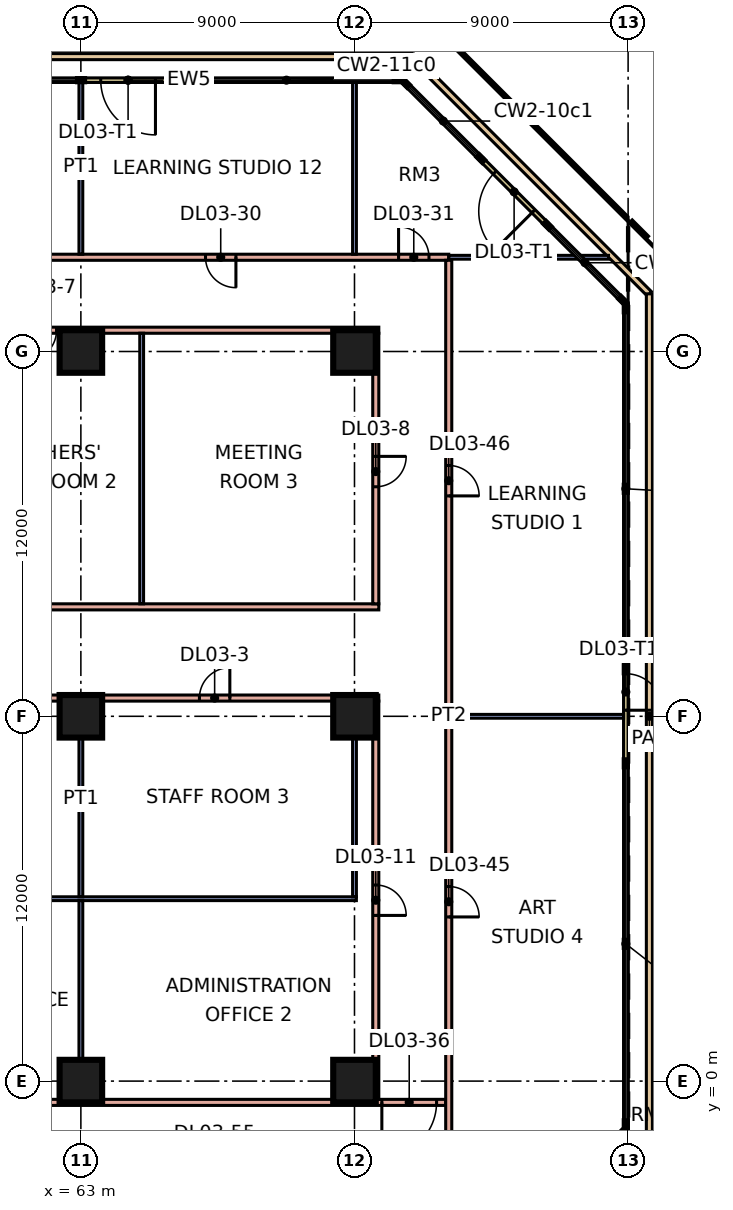
"""IFC4 building model, lengths in metres.
Left out: names, types, materials, properties, quantities, classifications, styles, units other than length and angle.
Written with IfcOpenShell. Run it as: python <this file> out.ifc"""

import sys

from ifc_helpers import new_model, si_unit, direction, frame, frame_2d, origin, origin_2d, place, context, subcontext, project, spatial, rectangle, extrude, element, fill, save


model = new_model("IFC4")
c1 = context("Model", 3, precision=1e-05, world=origin(), true_north=direction((0.0, 1.0)))
c2 = subcontext(c1, "Body", "Model", "MODEL_VIEW")
j1 = project(units=[si_unit("LENGTHUNIT", "METRE"), si_unit("PLANEANGLEUNIT", "RADIAN")], contexts=[c1])
p1 = place(None, origin())
s1 = spatial("IfcSite", under=j1, at=p1, CompositionType="ELEMENT")
p2 = place(p1, origin())
s2 = spatial("IfcBuilding", under=s1, at=p2, CompositionType="ELEMENT")
p3 = place(p2, frame((0.0, 0.0, 16.8)))
s3 = spatial("IfcBuildingStorey", under=s2, at=p3, CompositionType="ELEMENT", Elevation=16.8)
for number, where, z_axis, x_axis in (
    (1, (63.0, 0.0, 0.0), (0.0, 0.0, 1.0), (1.0, 0.0, 0.0)),
    (2, (72.0, 0.0, 0.0), (0.0, 0.0, 1.0), (1.0, 0.0, 0.0)),
    (3, (63.0, 12.0, 0.0), (0.0, 0.0, 1.0), (1.0, 0.0, 0.0)),
    (4, (72.0, 12.0, 0.0), (0.0, 0.0, 1.0), (1.0, 0.0, 0.0)),
    (5, (63.0, 24.0, 0.0), (0.0, 0.0, 1.0), (1.0, 0.0, 0.0)),
    (6, (72.0, 24.0, 0.0), (0.0, 0.0, 1.0), (1.0, 0.0, 0.0)),
):
    element("IfcColumn", number, at=place(p3, frame(where, z_axis=z_axis, x_axis=x_axis)), inside=s3, PredefinedType="COLUMN", context=c2, shape_type="SweptSolid", body=[
        extrude(rectangle(XDim=1.4, YDim=1.4, at=origin_2d()), origin(), (0.0, 0.0, 1.0), 4.8),
    ])
p4 = place(p3, frame((80.925, 10.5, 0.0), z_axis=(0.0, 0.0, 1.0), x_axis=(0.0, 1.0, 0.0)))
e7 = element("IfcWall", 7, at=p4, inside=s3, PredefinedType="SOLIDWALL", context=c2, shape_type="SweptSolid", body=[
    extrude(rectangle(XDim=3.0, YDim=0.15, at=frame_2d((1.5, 0.0))), origin(), (0.0, 0.0, 1.0), 4.4),
])
p5 = place(p4, frame((1.7, 0.0, 0.0)))
e8 = element("IfcOpeningElement", 8, at=p5, cuts=e7, PredefinedType="OPENING", context=c2, shape_type="SweptSolid", body=[
    extrude(rectangle(XDim=1.2, YDim=2.4, at=frame_2d((0.6, 1.2))), frame((0.0, 0.085, 0.0), z_axis=(0.0, -1.0, 0.0), x_axis=(1.0, 0.0, 0.0)), (0.0, 0.0, 1.0), 0.17),
])
p6 = place(p3, frame((78.311, 28.19, 0.0), z_axis=(0.0, 0.0, 1.0), x_axis=(-0.707106781187, 0.707106781187, 0.0)))
e9 = element("IfcWall", 9, at=p6, inside=s3, PredefinedType="SOLIDWALL", context=c2, shape_type="SweptSolid", body=[
    extrude(rectangle(XDim=3.0, YDim=0.15, at=frame_2d((1.5, 0.0))), origin(), (0.0, 0.0, 1.0), 4.4),
])
p7 = place(p6, frame((0.6, 0.0, 0.0)))
e10 = element("IfcOpeningElement", 10, at=p7, cuts=e9, PredefinedType="OPENING", context=c2, shape_type="SweptSolid", body=[
    extrude(rectangle(XDim=1.8, YDim=2.4, at=frame_2d((0.9, 1.2))), frame((0.0, 0.085, 0.0), z_axis=(0.0, -1.0, 0.0), x_axis=(1.0, 0.0, 0.0)), (0.0, 0.0, 1.0), 0.17),
])
p8 = place(p3, frame((66.053, 32.925, 0.0), z_axis=(0.0, 0.0, 1.0), x_axis=(-1.0, 0.0, 0.0)))
e11 = element("IfcWall", 11, at=p8, inside=s3, PredefinedType="SOLIDWALL", context=c2, shape_type="SweptSolid", body=[
    extrude(rectangle(XDim=3.0, YDim=0.15, at=frame_2d((1.5, 0.0))), origin(), (0.0, 0.0, 1.0), 4.4),
])
p9 = place(p8, frame((0.6, 0.0, 0.0)))
e12 = element("IfcOpeningElement", 12, at=p9, cuts=e11, PredefinedType="OPENING", context=c2, shape_type="SweptSolid", body=[
    extrude(rectangle(XDim=1.8, YDim=2.4, at=frame_2d((0.9, 1.2))), frame((0.0, 0.085, 0.0), z_axis=(0.0, -1.0, 0.0), x_axis=(1.0, 0.0, 0.0)), (0.0, 0.0, 1.0), 0.17),
])
p10 = place(p3, frame((56.2, 33.7, 0.0), z_axis=(0.0, 0.0, 1.0), x_axis=(1.0, 0.0, 0.0)))
e13 = element("IfcWall", 13, at=p10, inside=s3, PredefinedType="PARAPET", context=c2, shape_type="SweptSolid", body=[
    extrude(rectangle(XDim=17.697, YDim=0.2, at=frame_2d((8.848, 0.0))), origin(), (0.0, 0.0, 1.0), 0.5),
])
p11 = place(p3, frame((73.896, 33.7, 0.0), z_axis=(0.0, 0.0, 1.0), x_axis=(0.707106781187, -0.707106781187, 0.0)))
e14 = element("IfcWall", 14, at=p11, inside=s3, PredefinedType="PARAPET", context=c2, shape_type="SweptSolid", body=[
    extrude(rectangle(XDim=11.036, YDim=0.2, at=frame_2d((5.518, 0.0))), origin(), (0.0, 0.0, 1.0), 0.5),
])
p12 = place(p3, frame((81.7, 25.896, 0.0), z_axis=(0.0, 0.0, 1.0), x_axis=(0.0, -1.0, 0.0)))
e15 = element("IfcWall", 15, at=p12, inside=s3, PredefinedType="PARAPET", context=c2, shape_type="SweptSolid", body=[
    extrude(rectangle(XDim=27.793, YDim=0.2, at=frame_2d((13.896, 0.0))), origin(), (0.0, 0.0, 1.0), 0.5),
])
p13 = place(p3, frame((38.3, 27.1, 0.0), z_axis=(0.0, 0.0, 1.0), x_axis=(1.0, 0.0, 0.0)))
e16 = element("IfcWall", 16, at=p13, inside=s3, PredefinedType="PARTITIONING", context=c2, shape_type="SweptSolid", body=[
    extrude(rectangle(XDim=36.8, YDim=0.2, at=frame_2d((18.4, 0.0))), origin(), (0.0, 0.0, 1.0), 4.4),
])
p14 = place(p13, frame((10.8, 0.0, 0.0)))
e17 = element("IfcOpeningElement", 17, at=p14, cuts=e16, PredefinedType="OPENING", context=c2, shape_type="SweptSolid", body=[
    extrude(rectangle(XDim=1.0, YDim=2.1, at=frame_2d((0.5, 1.05))), frame((0.0, 0.11, 0.0), z_axis=(0.0, -1.0, 0.0), x_axis=(1.0, 0.0, 0.0)), (0.0, 0.0, 1.0), 0.22),
])
p15 = place(p13, frame((19.8, 0.0, 0.0)))
e18 = element("IfcOpeningElement", 18, at=p15, cuts=e16, PredefinedType="OPENING", context=c2, shape_type="SweptSolid", body=[
    extrude(rectangle(XDim=1.0, YDim=2.1, at=frame_2d((0.5, 1.05))), frame((0.0, 0.11, 0.0), z_axis=(0.0, -1.0, 0.0), x_axis=(1.0, 0.0, 0.0)), (0.0, 0.0, 1.0), 0.22),
])
p16 = place(p13, frame((28.8, 0.0, 0.0)))
e19 = element("IfcOpeningElement", 19, at=p16, cuts=e16, PredefinedType="OPENING", context=c2, shape_type="SweptSolid", body=[
    extrude(rectangle(XDim=1.0, YDim=2.1, at=frame_2d((0.5, 1.05))), frame((0.0, 0.11, 0.0), z_axis=(0.0, -1.0, 0.0), x_axis=(1.0, 0.0, 0.0)), (0.0, 0.0, 1.0), 0.22),
])
p17 = place(p13, frame((35.15, 0.0, 0.0)))
e20 = element("IfcOpeningElement", 20, at=p17, cuts=e16, PredefinedType="OPENING", context=c2, shape_type="SweptSolid", body=[
    extrude(rectangle(XDim=1.0, YDim=2.1, at=frame_2d((0.5, 1.05))), frame((0.0, 0.11, 0.0), z_axis=(0.0, -1.0, 0.0), x_axis=(1.0, 0.0, 0.0)), (0.0, 0.0, 1.0), 0.22),
])
p18 = place(p3, frame((40.2, 24.7, 0.0), z_axis=(0.0, 0.0, 1.0), x_axis=(1.0, 0.0, 0.0)))
e21 = element("IfcWall", 21, at=p18, inside=s3, PredefinedType="PARTITIONING", context=c2, shape_type="SweptSolid", body=[
    extrude(rectangle(XDim=32.6, YDim=0.2, at=frame_2d((16.3, 0.0))), origin(), (0.0, 0.0, 1.0), 4.4),
])
p19 = place(p18, frame((2.65, 0.0, 0.0)))
e22 = element("IfcOpeningElement", 22, at=p19, cuts=e21, PredefinedType="OPENING", context=c2, shape_type="SweptSolid", body=[
    extrude(rectangle(XDim=1.0, YDim=2.1, at=frame_2d((0.5, 1.05))), frame((0.0, 0.11, 0.0), z_axis=(0.0, -1.0, 0.0), x_axis=(1.0, 0.0, 0.0)), (0.0, 0.0, 1.0), 0.22),
])
p20 = place(p18, frame((8.85, 0.0, 0.0)))
e23 = element("IfcOpeningElement", 23, at=p20, cuts=e21, PredefinedType="OPENING", context=c2, shape_type="SweptSolid", body=[
    extrude(rectangle(XDim=1.0, YDim=2.1, at=frame_2d((0.5, 1.05))), frame((0.0, 0.11, 0.0), z_axis=(0.0, -1.0, 0.0), x_axis=(1.0, 0.0, 0.0)), (0.0, 0.0, 1.0), 0.22),
])
p21 = place(p18, frame((15.05, 0.0, 0.0)))
e24 = element("IfcOpeningElement", 24, at=p21, cuts=e21, PredefinedType="OPENING", context=c2, shape_type="SweptSolid", body=[
    extrude(rectangle(XDim=1.0, YDim=2.1, at=frame_2d((0.5, 1.05))), frame((0.0, 0.11, 0.0), z_axis=(0.0, -1.0, 0.0), x_axis=(1.0, 0.0, 0.0)), (0.0, 0.0, 1.0), 0.22),
])
p22 = place(p18, frame((21.0, 0.0, 0.0)))
e25 = element("IfcOpeningElement", 25, at=p22, cuts=e21, PredefinedType="OPENING", context=c2, shape_type="SweptSolid", body=[
    extrude(rectangle(XDim=1.0, YDim=2.1, at=frame_2d((0.5, 1.05))), frame((0.0, 0.11, 0.0), z_axis=(0.0, -1.0, 0.0), x_axis=(1.0, 0.0, 0.0)), (0.0, 0.0, 1.0), 0.22),
])
p23 = place(p3, frame((51.225, 15.6, 0.0), z_axis=(0.0, 0.0, 1.0), x_axis=(1.0, 0.0, 0.0)))
e26 = element("IfcWall", 26, at=p23, inside=s3, PredefinedType="PARTITIONING", context=c2, shape_type="SweptSolid", body=[
    extrude(rectangle(XDim=21.575, YDim=0.2, at=frame_2d((10.788, 0.0))), origin(), (0.0, 0.0, 1.0), 4.4),
])
p24 = place(p3, frame((54.0, -0.7, 0.0), z_axis=(0.0, 0.0, 1.0), x_axis=(1.0, 0.0, 0.0)))
e27 = element("IfcWall", 27, at=p24, inside=s3, PredefinedType="PARTITIONING", context=c2, shape_type="SweptSolid", body=[
    extrude(rectangle(XDim=21.0, YDim=0.2, at=frame_2d((10.5, 0.0))), origin(), (0.0, 0.0, 1.0), 4.4),
])
p25 = place(p24, frame((4.1, 0.0, 0.0)))
e28 = element("IfcOpeningElement", 28, at=p25, cuts=e27, PredefinedType="OPENING", context=c2, shape_type="SweptSolid", body=[
    extrude(rectangle(XDim=1.0, YDim=2.1, at=frame_2d((0.5, 1.05))), frame((0.0, 0.11, 0.0), z_axis=(0.0, -1.0, 0.0), x_axis=(1.0, 0.0, 0.0)), (0.0, 0.0, 1.0), 0.22),
])
p26 = place(p24, frame((18.9, 0.0, 0.0)))
e29 = element("IfcOpeningElement", 29, at=p26, cuts=e27, PredefinedType="OPENING", context=c2, shape_type="SweptSolid", body=[
    extrude(rectangle(XDim=1.8, YDim=2.1, at=frame_2d((0.9, 1.05))), frame((0.0, 0.11, 0.0), z_axis=(0.0, -1.0, 0.0), x_axis=(1.0, 0.0, 0.0)), (0.0, 0.0, 1.0), 0.22),
])
p27 = place(p3, frame((54.0, 12.6, 0.0), z_axis=(0.0, 0.0, 1.0), x_axis=(1.0, 0.0, 0.0)))
e30 = element("IfcWall", 30, at=p27, inside=s3, PredefinedType="PARTITIONING", context=c2, shape_type="SweptSolid", body=[
    extrude(rectangle(XDim=18.8, YDim=0.2, at=frame_2d((9.4, 0.0))), origin(), (0.0, 0.0, 1.0), 4.4),
])
p28 = place(p27, frame((3.9, 0.0, 0.0)))
e31 = element("IfcOpeningElement", 31, at=p28, cuts=e30, PredefinedType="OPENING", context=c2, shape_type="SweptSolid", body=[
    extrude(rectangle(XDim=1.0, YDim=2.1, at=frame_2d((0.5, 1.05))), frame((0.0, 0.11, 0.0), z_axis=(0.0, -1.0, 0.0), x_axis=(1.0, 0.0, 0.0)), (0.0, 0.0, 1.0), 0.22),
])
p29 = place(p27, frame((12.9, 0.0, 0.0)))
e32 = element("IfcOpeningElement", 32, at=p29, cuts=e30, PredefinedType="OPENING", context=c2, shape_type="SweptSolid", body=[
    extrude(rectangle(XDim=1.0, YDim=2.1, at=frame_2d((0.5, 1.05))), frame((0.0, 0.11, 0.0), z_axis=(0.0, -1.0, 0.0), x_axis=(1.0, 0.0, 0.0)), (0.0, 0.0, 1.0), 0.22),
])
p30 = place(p3, frame((54.1, 6.0, 0.0), z_axis=(0.0, 0.0, 1.0), x_axis=(1.0, 0.0, 0.0)))
e33 = element("IfcWall", 33, at=p30, inside=s3, PredefinedType="PARTITIONING", context=c2, shape_type="SweptSolid", body=[
    extrude(rectangle(XDim=17.962, YDim=0.125, at=frame_2d((8.981, 0.0))), origin(), (0.0, 0.0, 1.0), 4.4),
])
p31 = place(p3, frame((63.0, -0.6, 0.0), z_axis=(0.0, 0.0, 1.0), x_axis=(0.0, 1.0, 0.0)))
e34 = element("IfcWall", 34, at=p31, inside=s3, PredefinedType="PARTITIONING", context=c2, shape_type="SweptSolid", body=[
    extrude(rectangle(XDim=6.538, YDim=0.125, at=frame_2d((3.269, 0.0))), origin(), (0.0, 0.0, 1.0), 4.4),
])
p32 = place(p3, frame((63.0, 6.062, 0.0), z_axis=(0.0, 0.0, 1.0), x_axis=(0.0, 1.0, 0.0)))
e35 = element("IfcWall", 35, at=p32, inside=s3, PredefinedType="PARTITIONING", context=c2, shape_type="SweptSolid", body=[
    extrude(rectangle(XDim=6.438, YDim=0.125, at=frame_2d((3.219, 0.0))), origin(), (0.0, 0.0, 1.0), 4.4),
])
p33 = place(p3, frame((63.0, 27.2, 0.0), z_axis=(0.0, 0.0, 1.0), x_axis=(0.0, 1.0, 0.0)))
e36 = element("IfcWall", 36, at=p33, inside=s3, PredefinedType="PARTITIONING", context=c2, shape_type="SweptSolid", body=[
    extrude(rectangle(XDim=5.725, YDim=0.125, at=frame_2d((2.863, 0.0))), origin(), (0.0, 0.0, 1.0), 4.4),
])
p34 = place(p3, frame((65.0, 15.7, 0.0), z_axis=(0.0, 0.0, 1.0), x_axis=(0.0, 1.0, 0.0)))
e37 = element("IfcWall", 37, at=p34, inside=s3, PredefinedType="PARTITIONING", context=c2, shape_type="SweptSolid", body=[
    extrude(rectangle(XDim=8.9, YDim=0.125, at=frame_2d((4.45, 0.0))), origin(), (0.0, 0.0, 1.0), 4.4),
])
p35 = place(p3, frame((72.0, 6.062, 0.0), z_axis=(0.0, 0.0, 1.0), x_axis=(0.0, 1.0, 0.0)))
e38 = element("IfcWall", 38, at=p35, inside=s3, PredefinedType="PARTITIONING", context=c2, shape_type="SweptSolid", body=[
    extrude(rectangle(XDim=6.438, YDim=0.125, at=frame_2d((3.219, 0.0))), origin(), (0.0, 0.0, 1.0), 4.4),
])
p36 = place(p3, frame((72.0, 27.2, 0.0), z_axis=(0.0, 0.0, 1.0), x_axis=(0.0, 1.0, 0.0)))
e39 = element("IfcWall", 39, at=p36, inside=s3, PredefinedType="PARTITIONING", context=c2, shape_type="SweptSolid", body=[
    extrude(rectangle(XDim=6.4, YDim=0.125, at=frame_2d((3.2, 0.0))), origin(), (0.0, 0.0, 1.0), 4.4),
])
p37 = place(p3, frame((72.7, -0.6, 0.0), z_axis=(0.0, 0.0, 1.0), x_axis=(0.0, 1.0, 0.0)))
e40 = element("IfcWall", 40, at=p37, inside=s3, PredefinedType="PARTITIONING", context=c2, shape_type="SweptSolid", body=[
    extrude(rectangle(XDim=13.1, YDim=0.2, at=frame_2d((6.55, 0.0))), origin(), (0.0, 0.0, 1.0), 4.4),
])
p38 = place(p37, frame((6.05, 0.0, 0.0)))
e41 = element("IfcOpeningElement", 41, at=p38, cuts=e40, PredefinedType="OPENING", context=c2, shape_type="SweptSolid", body=[
    extrude(rectangle(XDim=1.0, YDim=2.1, at=frame_2d((0.5, 1.05))), frame((0.0, 0.11, 0.0), z_axis=(0.0, -1.0, 0.0), x_axis=(1.0, 0.0, 0.0)), (0.0, 0.0, 1.0), 0.22),
])
p39 = place(p3, frame((72.7, 15.7, 0.0), z_axis=(0.0, 0.0, 1.0), x_axis=(0.0, 1.0, 0.0)))
e42 = element("IfcWall", 42, at=p39, inside=s3, PredefinedType="PARTITIONING", context=c2, shape_type="SweptSolid", body=[
    extrude(rectangle(XDim=8.9, YDim=0.2, at=frame_2d((4.45, 0.0))), origin(), (0.0, 0.0, 1.0), 4.4),
])
p40 = place(p39, frame((3.85, 0.0, 0.0)))
e43 = element("IfcOpeningElement", 43, at=p40, cuts=e42, PredefinedType="OPENING", context=c2, shape_type="SweptSolid", body=[
    extrude(rectangle(XDim=1.0, YDim=2.1, at=frame_2d((0.5, 1.05))), frame((0.0, 0.11, 0.0), z_axis=(0.0, -1.0, 0.0), x_axis=(1.0, 0.0, 0.0)), (0.0, 0.0, 1.0), 0.22),
])
p41 = place(p3, frame((75.1, -3.0, 0.0), z_axis=(0.0, 0.0, 1.0), x_axis=(0.0, 1.0, 0.0)))
e44 = element("IfcWall", 44, at=p41, inside=s3, PredefinedType="PARTITIONING", context=c2, shape_type="SweptSolid", body=[
    extrude(rectangle(XDim=30.0, YDim=0.2, at=frame_2d((15.0, 0.0))), origin(), (0.0, 0.0, 1.0), 4.4),
])
p42 = place(p41, frame((8.4, 0.0, 0.0)))
e45 = element("IfcOpeningElement", 45, at=p42, cuts=e44, PredefinedType="OPENING", context=c2, shape_type="SweptSolid", body=[
    extrude(rectangle(XDim=1.0, YDim=2.1, at=frame_2d((0.5, 1.05))), frame((0.0, 0.11, 0.0), z_axis=(0.0, -1.0, 0.0), x_axis=(1.0, 0.0, 0.0)), (0.0, 0.0, 1.0), 0.22),
])
p43 = place(p41, frame((22.25, 0.0, 0.0)))
e46 = element("IfcOpeningElement", 46, at=p43, cuts=e44, PredefinedType="OPENING", context=c2, shape_type="SweptSolid", body=[
    extrude(rectangle(XDim=1.0, YDim=2.1, at=frame_2d((0.5, 1.05))), frame((0.0, 0.11, 0.0), z_axis=(0.0, -1.0, 0.0), x_axis=(1.0, 0.0, 0.0)), (0.0, 0.0, 1.0), 0.22),
])
p44 = place(p3, frame((75.1, 27.1, 0.0), z_axis=(0.0, 0.0, 1.0), x_axis=(1.0, 0.0, 0.0)))
e47 = element("IfcWall", 47, at=p44, inside=s3, PredefinedType="PARTITIONING", context=c2, shape_type="SweptSolid", body=[
    extrude(rectangle(XDim=5.255, YDim=0.125, at=frame_2d((2.627, 0.0))), origin(), (0.0, 0.0, 1.0), 4.4),
])
p45 = place(p3, frame((75.2, 12.0, 0.0), z_axis=(0.0, 0.0, 1.0), x_axis=(1.0, 0.0, 0.0)))
e48 = element("IfcWall", 48, at=p45, inside=s3, PredefinedType="PARTITIONING", context=c2, shape_type="SweptSolid", body=[
    extrude(rectangle(XDim=5.651, YDim=0.125, at=frame_2d((2.826, 0.0))), origin(), (0.0, 0.0, 1.0), 4.4),
])
p46 = place(p5, frame((1.2, 0.0, 0.0), z_axis=(0.0, 0.0, 1.0), x_axis=(-1.0, 0.0, 0.0)))
e49 = element("IfcDoor", 49, at=p46, inside=s3, OperationType="DOUBLE_DOOR_SINGLE_SWING", PredefinedType="DOOR", context=c2, shape_type="SweptSolid", body=[
    extrude(rectangle(XDim=1.2, YDim=2.4, at=frame_2d((0.6, 1.2))), frame((0.0, 0.025, 0.0), z_axis=(0.0, -1.0, 0.0), x_axis=(1.0, 0.0, 0.0)), (0.0, 0.0, 1.0), 0.05),
])
fill(e8, e49)
p47 = place(p7, origin())
e50 = element("IfcDoor", 50, at=p47, inside=s3, OperationType="DOUBLE_DOOR_SINGLE_SWING", PredefinedType="DOOR", context=c2, shape_type="SweptSolid", body=[
    extrude(rectangle(XDim=1.8, YDim=2.4, at=frame_2d((0.9, 1.2))), frame((0.0, 0.025, 0.0), z_axis=(0.0, -1.0, 0.0), x_axis=(1.0, 0.0, 0.0)), (0.0, 0.0, 1.0), 0.05),
])
fill(e10, e50)
p48 = place(p9, origin())
e51 = element("IfcDoor", 51, at=p48, inside=s3, OperationType="DOUBLE_DOOR_SINGLE_SWING", PredefinedType="DOOR", context=c2, shape_type="SweptSolid", body=[
    extrude(rectangle(XDim=1.8, YDim=2.4, at=frame_2d((0.9, 1.2))), frame((0.0, 0.025, 0.0), z_axis=(0.0, -1.0, 0.0), x_axis=(1.0, 0.0, 0.0)), (0.0, 0.0, 1.0), 0.05),
])
fill(e12, e51)
p49 = place(p29, frame((1.0, 0.0, 0.0), z_axis=(0.0, 0.0, 1.0), x_axis=(-1.0, 0.0, 0.0)))
e52 = element("IfcDoor", 52, at=p49, inside=s3, OperationType="SINGLE_SWING_RIGHT", PredefinedType="DOOR", context=c2, shape_type="SweptSolid", body=[
    extrude(rectangle(XDim=1.0, YDim=2.1, at=frame_2d((0.5, 1.05))), frame((0.0, 0.025, 0.0), z_axis=(0.0, -1.0, 0.0), x_axis=(1.0, 0.0, 0.0)), (0.0, 0.0, 1.0), 0.05),
])
fill(e32, e52)
p50 = place(p22, frame((1.0, 0.0, 0.0), z_axis=(0.0, 0.0, 1.0), x_axis=(-1.0, 0.0, 0.0)))
e53 = element("IfcDoor", 53, at=p50, inside=s3, OperationType="SINGLE_SWING_LEFT", PredefinedType="DOOR", context=c2, shape_type="SweptSolid", body=[
    extrude(rectangle(XDim=1.0, YDim=2.1, at=frame_2d((0.5, 1.05))), frame((0.0, 0.025, 0.0), z_axis=(0.0, -1.0, 0.0), x_axis=(1.0, 0.0, 0.0)), (0.0, 0.0, 1.0), 0.05),
])
fill(e25, e53)
p51 = place(p40, origin())
e54 = element("IfcDoor", 54, at=p51, inside=s3, OperationType="SINGLE_SWING_RIGHT", PredefinedType="DOOR", context=c2, shape_type="SweptSolid", body=[
    extrude(rectangle(XDim=1.0, YDim=2.1, at=frame_2d((0.5, 1.05))), frame((0.0, 0.025, 0.0), z_axis=(0.0, -1.0, 0.0), x_axis=(1.0, 0.0, 0.0)), (0.0, 0.0, 1.0), 0.05),
])
fill(e43, e54)
p52 = place(p38, frame((1.0, 0.0, 0.0), z_axis=(0.0, 0.0, 1.0), x_axis=(-1.0, 0.0, 0.0)))
e55 = element("IfcDoor", 55, at=p52, inside=s3, OperationType="SINGLE_SWING_LEFT", PredefinedType="DOOR", context=c2, shape_type="SweptSolid", body=[
    extrude(rectangle(XDim=1.0, YDim=2.1, at=frame_2d((0.5, 1.05))), frame((0.0, 0.025, 0.0), z_axis=(0.0, -1.0, 0.0), x_axis=(1.0, 0.0, 0.0)), (0.0, 0.0, 1.0), 0.05),
])
fill(e41, e55)
p53 = place(p16, origin())
e56 = element("IfcDoor", 56, at=p53, inside=s3, OperationType="SINGLE_SWING_RIGHT", PredefinedType="DOOR", context=c2, shape_type="SweptSolid", body=[
    extrude(rectangle(XDim=1.0, YDim=2.1, at=frame_2d((0.5, 1.05))), frame((0.0, 0.025, 0.0), z_axis=(0.0, -1.0, 0.0), x_axis=(1.0, 0.0, 0.0)), (0.0, 0.0, 1.0), 0.05),
])
fill(e19, e56)
p54 = place(p17, origin())
e57 = element("IfcDoor", 57, at=p54, inside=s3, OperationType="SINGLE_SWING_LEFT", PredefinedType="DOOR", context=c2, shape_type="SweptSolid", body=[
    extrude(rectangle(XDim=1.0, YDim=2.1, at=frame_2d((0.5, 1.05))), frame((0.0, 0.025, 0.0), z_axis=(0.0, -1.0, 0.0), x_axis=(1.0, 0.0, 0.0)), (0.0, 0.0, 1.0), 0.05),
])
fill(e20, e57)
p55 = place(p26, frame((1.8, 0.0, 0.0), z_axis=(0.0, 0.0, 1.0), x_axis=(-1.0, 0.0, 0.0)))
e58 = element("IfcDoor", 58, at=p55, inside=s3, OperationType="DOUBLE_DOOR_SINGLE_SWING", PredefinedType="DOOR", context=c2, shape_type="SweptSolid", body=[
    extrude(rectangle(XDim=1.8, YDim=2.1, at=frame_2d((0.9, 1.05))), frame((0.0, 0.025, 0.0), z_axis=(0.0, -1.0, 0.0), x_axis=(1.0, 0.0, 0.0)), (0.0, 0.0, 1.0), 0.05),
])
fill(e29, e58)
p56 = place(p42, frame((1.0, 0.0, 0.0), z_axis=(0.0, 0.0, 1.0), x_axis=(-1.0, 0.0, 0.0)))
e59 = element("IfcDoor", 59, at=p56, inside=s3, OperationType="SINGLE_SWING_LEFT", PredefinedType="DOOR", context=c2, shape_type="SweptSolid", body=[
    extrude(rectangle(XDim=1.0, YDim=2.1, at=frame_2d((0.5, 1.05))), frame((0.0, 0.025, 0.0), z_axis=(0.0, -1.0, 0.0), x_axis=(1.0, 0.0, 0.0)), (0.0, 0.0, 1.0), 0.05),
])
fill(e45, e59)
p57 = place(p43, frame((1.0, 0.0, 0.0), z_axis=(0.0, 0.0, 1.0), x_axis=(-1.0, 0.0, 0.0)))
e60 = element("IfcDoor", 60, at=p57, inside=s3, OperationType="SINGLE_SWING_LEFT", PredefinedType="DOOR", context=c2, shape_type="SweptSolid", body=[
    extrude(rectangle(XDim=1.0, YDim=2.1, at=frame_2d((0.5, 1.05))), frame((0.0, 0.025, 0.0), z_axis=(0.0, -1.0, 0.0), x_axis=(1.0, 0.0, 0.0)), (0.0, 0.0, 1.0), 0.05),
])
fill(e46, e60)
save(model, sys.argv[1])
